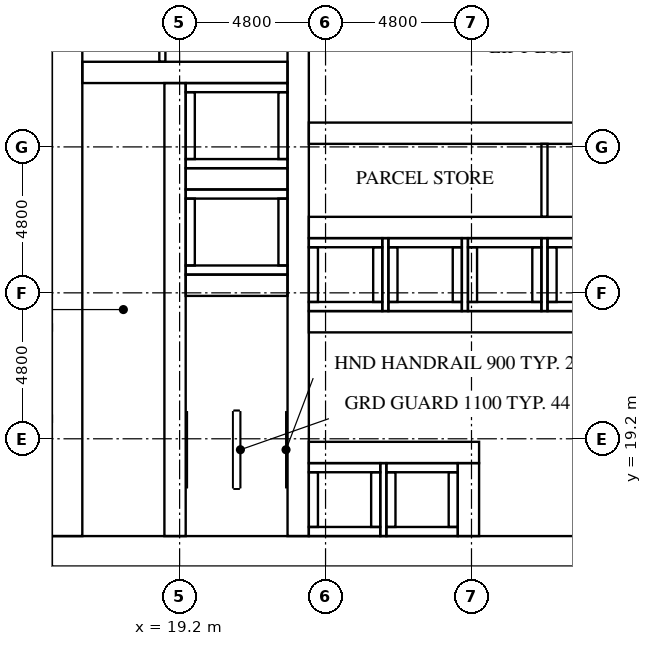
"""IFC4 building model, lengths in metres.
Left out: names, types, materials, properties, quantities, classifications, styles, units other than length and angle.
Written with IfcOpenShell. Run it as: python <this file> out.ifc"""

import sys

from ifc_helpers import new_model, si_unit, direction, frame, frame_2d, origin, place, context, subcontext, project, spatial, rectangle, extrude, element, fill, save


model = new_model("IFC4")
c1 = context("Model", 3, precision=1e-05, world=origin(), true_north=direction((0.0, 1.0)))
c2 = subcontext(c1, "Body", "Model", "MODEL_VIEW")
j1 = project(units=[si_unit("LENGTHUNIT", "METRE"), si_unit("PLANEANGLEUNIT", "RADIAN")], contexts=[c1])
p1 = place(None, origin())
s1 = spatial("IfcSite", under=j1, at=p1, CompositionType="ELEMENT")
p2 = place(p1, origin())
s2 = spatial("IfcBuilding", under=s1, at=p2, CompositionType="ELEMENT")
p3 = place(p2, origin())
s3 = spatial("IfcBuildingStorey", under=s2, at=p3, CompositionType="ELEMENT", Elevation=0.0)
p4 = place(p3, frame((15.0, 15.5, 0.0), z_axis=(0.0, 0.0, 1.0), x_axis=(1.0, 0.0, 0.0)))
e1 = element("IfcWall", 1, at=p4, inside=s3, PredefinedType="SHEAR", context=c2, shape_type="SweptSolid", body=[
    extrude(rectangle(XDim=32.4, YDim=1.0, at=frame_2d((16.2, 0.0))), origin(), (0.0, 0.0, 1.0), 5.7),
])
p5 = place(p4, frame((15.3, 0.0, 0.0)))
e2 = element("IfcOpeningElement", 2, at=p5, cuts=e1, PredefinedType="OPENING", context=c2, shape_type="SweptSolid", body=[
    extrude(rectangle(XDim=1.8, YDim=2.1, at=frame_2d((0.9, 1.05))), frame((0.0, 0.51, 0.0), z_axis=(0.0, -1.0, 0.0), x_axis=(1.0, 0.0, 0.0)), (0.0, 0.0, 1.0), 1.02),
])
p6 = place(p3, frame((15.5, 16.0, 0.0), z_axis=(0.0, 0.0, 1.0), x_axis=(0.0, 1.0, 0.0)))
e3 = element("IfcWall", 3, at=p6, inside=s3, PredefinedType="SHEAR", context=c2, shape_type="SweptSolid", body=[
    extrude(rectangle(XDim=20.8, YDim=1.0, at=frame_2d((10.4, 0.0))), origin(), (0.0, 0.0, 1.0), 5.7),
])
p7 = place(p6, frame((4.76, 0.0, 0.0)))
e4 = element("IfcOpeningElement", 4, at=p7, cuts=e3, PredefinedType="OPENING", context=c2, shape_type="SweptSolid", body=[
    extrude(rectangle(XDim=1.2, YDim=2.1, at=frame_2d((0.6, 1.05))), frame((0.0, 0.51, 0.0), z_axis=(0.0, -1.0, 0.0), x_axis=(1.0, 0.0, 0.0)), (0.0, 0.0, 1.0), 1.02),
])
p8 = place(p3, frame((19.05, 16.0, 0.0), z_axis=(0.0, 0.0, 1.0), x_axis=(0.0, 1.0, 0.0)))
e5 = element("IfcWall", 5, at=p8, inside=s3, PredefinedType="SHEAR", context=c2, shape_type="SweptSolid", body=[
    extrude(rectangle(XDim=14.9, YDim=0.7, at=frame_2d((7.45, 0.0))), origin(), (0.0, 0.0, 1.0), 5.7),
])
p9 = place(p8, frame((9.45, 0.0, 0.0)))
e6 = element("IfcOpeningElement", 6, at=p9, cuts=e5, PredefinedType="OPENING", context=c2, shape_type="SweptSolid", body=[
    extrude(rectangle(XDim=1.1, YDim=2.1, at=frame_2d((0.55, 1.05))), frame((0.0, 0.36, 0.0), z_axis=(0.0, -1.0, 0.0), x_axis=(1.0, 0.0, 0.0)), (0.0, 0.0, 1.0), 0.72),
])
p10 = place(p8, frame((12.95, 0.0, 0.0)))
e7 = element("IfcOpeningElement", 7, at=p10, cuts=e5, PredefinedType="OPENING", context=c2, shape_type="SweptSolid", body=[
    extrude(rectangle(XDim=1.1, YDim=2.1, at=frame_2d((0.55, 1.05))), frame((0.0, 0.36, 0.0), z_axis=(0.0, -1.0, 0.0), x_axis=(1.0, 0.0, 0.0)), (0.0, 0.0, 1.0), 0.72),
])
p11 = place(p8, frame((0.2, 0.0, 0.0)))
e8 = element("IfcOpeningElement", 8, at=p11, cuts=e5, PredefinedType="OPENING", context=c2, shape_type="SweptSolid", body=[
    extrude(rectangle(XDim=1.2, YDim=2.1, at=frame_2d((0.6, 1.05))), frame((0.0, 0.36, 0.0), z_axis=(0.0, -1.0, 0.0), x_axis=(1.0, 0.0, 0.0)), (0.0, 0.0, 1.0), 0.72),
])
p12 = place(p3, frame((23.1, 16.0, 0.0), z_axis=(0.0, 0.0, 1.0), x_axis=(0.0, 1.0, 0.0)))
e9 = element("IfcWall", 9, at=p12, inside=s3, PredefinedType="SHEAR", context=c2, shape_type="SweptSolid", body=[
    extrude(rectangle(XDim=20.8, YDim=0.7, at=frame_2d((10.4, 0.0))), origin(), (0.0, 0.0, 1.0), 5.7),
])
for number, where, z_axis, x_axis in (
    (10, (19.4, 24.25, 0.0), (0.0, 0.0, 1.0), (1.0, 0.0, 0.0)),
    (11, (19.4, 27.75, 0.0), (0.0, 0.0, 1.0), (1.0, 0.0, 0.0)),
):
    element("IfcWall", number, at=place(p3, frame(where, z_axis=z_axis, x_axis=x_axis)), inside=s3, PredefinedType="SHEAR", context=c2, shape_type="SweptSolid", body=[
        extrude(rectangle(XDim=3.35, YDim=0.7, at=frame_2d((1.675, 0.0))), origin(), (0.0, 0.0, 1.0), 5.7),
    ])
p13 = place(p3, frame((16.0, 31.25, 0.0), z_axis=(0.0, 0.0, 1.0), x_axis=(1.0, 0.0, 0.0)))
e12 = element("IfcWall", 12, at=p13, inside=s3, PredefinedType="SHEAR", context=c2, shape_type="SweptSolid", body=[
    extrude(rectangle(XDim=6.75, YDim=0.7, at=frame_2d((3.375, 0.0))), origin(), (0.0, 0.0, 1.0), 5.7),
])
p14 = place(p3, frame((23.45, 18.75, 0.0), z_axis=(0.0, 0.0, 1.0), x_axis=(1.0, 0.0, 0.0)))
e13 = element("IfcWall", 13, at=p14, inside=s3, PredefinedType="SHEAR", context=c2, shape_type="SweptSolid", body=[
    extrude(rectangle(XDim=5.6, YDim=0.7, at=frame_2d((2.8, 0.0))), origin(), (0.0, 0.0, 1.0), 5.7),
])
p15 = place(p14, frame((0.625, 0.0, 0.0)))
e14 = element("IfcOpeningElement", 14, at=p15, cuts=e13, PredefinedType="OPENING", context=c2, shape_type="SweptSolid", body=[
    extrude(rectangle(XDim=1.1, YDim=2.1, at=frame_2d((0.55, 1.05))), frame((0.0, 0.36, 0.0), z_axis=(0.0, -1.0, 0.0), x_axis=(1.0, 0.0, 0.0)), (0.0, 0.0, 1.0), 0.72),
])
p16 = place(p14, frame((3.175, 0.0, 0.0)))
e15 = element("IfcOpeningElement", 15, at=p16, cuts=e13, PredefinedType="OPENING", context=c2, shape_type="SweptSolid", body=[
    extrude(rectangle(XDim=1.1, YDim=2.1, at=frame_2d((0.55, 1.05))), frame((0.0, 0.36, 0.0), z_axis=(0.0, -1.0, 0.0), x_axis=(1.0, 0.0, 0.0)), (0.0, 0.0, 1.0), 0.72),
])
p17 = place(p3, frame((23.45, 23.05, 0.0), z_axis=(0.0, 0.0, 1.0), x_axis=(1.0, 0.0, 0.0)))
e16 = element("IfcWall", 16, at=p17, inside=s3, PredefinedType="SHEAR", context=c2, shape_type="SweptSolid", body=[
    extrude(rectangle(XDim=15.5, YDim=0.7, at=frame_2d((7.75, 0.0))), origin(), (0.0, 0.0, 1.0), 5.7),
])
p18 = place(p17, frame((0.658, 0.0, 0.0)))
e17 = element("IfcOpeningElement", 17, at=p18, cuts=e16, PredefinedType="OPENING", context=c2, shape_type="SweptSolid", body=[
    extrude(rectangle(XDim=1.1, YDim=2.1, at=frame_2d((0.55, 1.05))), frame((0.0, 0.36, 0.0), z_axis=(0.0, -1.0, 0.0), x_axis=(1.0, 0.0, 0.0)), (0.0, 0.0, 1.0), 0.72),
])
p19 = place(p17, frame((3.275, 0.0, 0.0)))
e18 = element("IfcOpeningElement", 18, at=p19, cuts=e16, PredefinedType="OPENING", context=c2, shape_type="SweptSolid", body=[
    extrude(rectangle(XDim=1.1, YDim=2.1, at=frame_2d((0.55, 1.05))), frame((0.0, 0.36, 0.0), z_axis=(0.0, -1.0, 0.0), x_axis=(1.0, 0.0, 0.0)), (0.0, 0.0, 1.0), 0.72),
])
p20 = place(p17, frame((5.892, 0.0, 0.0)))
e19 = element("IfcOpeningElement", 19, at=p20, cuts=e16, PredefinedType="OPENING", context=c2, shape_type="SweptSolid", body=[
    extrude(rectangle(XDim=1.1, YDim=2.1, at=frame_2d((0.55, 1.05))), frame((0.0, 0.36, 0.0), z_axis=(0.0, -1.0, 0.0), x_axis=(1.0, 0.0, 0.0)), (0.0, 0.0, 1.0), 0.72),
])
p21 = place(p17, frame((8.508, 0.0, 0.0)))
e20 = element("IfcOpeningElement", 20, at=p21, cuts=e16, PredefinedType="OPENING", context=c2, shape_type="SweptSolid", body=[
    extrude(rectangle(XDim=1.1, YDim=2.1, at=frame_2d((0.55, 1.05))), frame((0.0, 0.36, 0.0), z_axis=(0.0, -1.0, 0.0), x_axis=(1.0, 0.0, 0.0)), (0.0, 0.0, 1.0), 0.72),
])
p22 = place(p17, frame((12.483, 0.0, 0.0)))
e21 = element("IfcOpeningElement", 21, at=p22, cuts=e16, PredefinedType="OPENING", context=c2, shape_type="SweptSolid", body=[
    extrude(rectangle(XDim=1.0, YDim=2.1, at=frame_2d((0.5, 1.05))), frame((0.0, 0.36, 0.0), z_axis=(0.0, -1.0, 0.0), x_axis=(1.0, 0.0, 0.0)), (0.0, 0.0, 1.0), 0.72),
])
p23 = place(p3, frame((23.45, 26.15, 0.0), z_axis=(0.0, 0.0, 1.0), x_axis=(1.0, 0.0, 0.0)))
e22 = element("IfcWall", 22, at=p23, inside=s3, PredefinedType="SHEAR", context=c2, shape_type="SweptSolid", body=[
    extrude(rectangle(XDim=15.5, YDim=0.7, at=frame_2d((7.75, 0.0))), origin(), (0.0, 0.0, 1.0), 5.7),
])
p24 = place(p3, frame((23.45, 29.25, 0.0), z_axis=(0.0, 0.0, 1.0), x_axis=(1.0, 0.0, 0.0)))
e23 = element("IfcWall", 23, at=p24, inside=s3, PredefinedType="SHEAR", context=c2, shape_type="SweptSolid", body=[
    extrude(rectangle(XDim=15.5, YDim=0.7, at=frame_2d((7.75, 0.0))), origin(), (0.0, 0.0, 1.0), 5.7),
])
p25 = place(p24, frame((3.325, 0.0, 0.0)))
e24 = element("IfcOpeningElement", 24, at=p25, cuts=e23, PredefinedType="OPENING", context=c2, shape_type="SweptSolid", body=[
    extrude(rectangle(XDim=1.0, YDim=2.1, at=frame_2d((0.5, 1.05))), frame((0.0, 0.36, 0.0), z_axis=(0.0, -1.0, 0.0), x_axis=(1.0, 0.0, 0.0)), (0.0, 0.0, 1.0), 0.72),
])
p26 = place(p24, frame((11.175, 0.0, 0.0)))
e25 = element("IfcOpeningElement", 25, at=p26, cuts=e23, PredefinedType="OPENING", context=c2, shape_type="SweptSolid", body=[
    extrude(rectangle(XDim=1.0, YDim=2.1, at=frame_2d((0.5, 1.05))), frame((0.0, 0.36, 0.0), z_axis=(0.0, -1.0, 0.0), x_axis=(1.0, 0.0, 0.0)), (0.0, 0.0, 1.0), 0.72),
])
p27 = place(p3, frame((28.7, 16.0, 0.0), z_axis=(0.0, 0.0, 1.0), x_axis=(0.0, 1.0, 0.0)))
e26 = element("IfcWall", 26, at=p27, inside=s3, PredefinedType="SHEAR", context=c2, shape_type="SweptSolid", body=[
    extrude(rectangle(XDim=2.4, YDim=0.7, at=frame_2d((1.2, 0.0))), origin(), (0.0, 0.0, 1.0), 5.7),
])
for number, where, z_axis, x_axis in (
    (27, (23.45, 16.15, -1.8), (0.0, 0.0, 1.0), (1.0, 0.0, 0.0)),
    (28, (23.45, 18.25, -1.8), (0.0, 0.0, 1.0), (1.0, 0.0, 0.0)),
):
    element("IfcWall", number, at=place(p3, frame(where, z_axis=z_axis, x_axis=x_axis)), inside=s3, PredefinedType="SOLIDWALL", context=c2, shape_type="SweptSolid", body=[
        extrude(rectangle(XDim=2.35, YDim=0.3, at=frame_2d((1.175, 0.0))), origin(), (0.0, 0.0, 1.0), 1.8),
    ])
for number, where, z_axis, x_axis in (
    (29, (23.6, 16.3, -1.8), (0.0, 0.0, 1.0), (0.0, 1.0, 0.0)),
    (30, (25.65, 16.3, -1.8), (0.0, 0.0, 1.0), (0.0, 1.0, 0.0)),
):
    element("IfcWall", number, at=place(p3, frame(where, z_axis=z_axis, x_axis=x_axis)), inside=s3, PredefinedType="SOLIDWALL", context=c2, shape_type="SweptSolid", body=[
        extrude(rectangle(XDim=1.8, YDim=0.3, at=frame_2d((0.9, 0.0))), origin(), (0.0, 0.0, 1.0), 1.8),
    ])
for number, where, z_axis, x_axis in (
    (31, (26.0, 16.15, -1.8), (0.0, 0.0, 1.0), (1.0, 0.0, 0.0)),
    (32, (26.0, 18.25, -1.8), (0.0, 0.0, 1.0), (1.0, 0.0, 0.0)),
):
    element("IfcWall", number, at=place(p3, frame(where, z_axis=z_axis, x_axis=x_axis)), inside=s3, PredefinedType="SOLIDWALL", context=c2, shape_type="SweptSolid", body=[
        extrude(rectangle(XDim=2.35, YDim=0.3, at=frame_2d((1.175, 0.0))), origin(), (0.0, 0.0, 1.0), 1.8),
    ])
for number, where, z_axis, x_axis in (
    (33, (26.15, 16.3, -1.8), (0.0, 0.0, 1.0), (0.0, 1.0, 0.0)),
    (34, (28.2, 16.3, -1.8), (0.0, 0.0, 1.0), (0.0, 1.0, 0.0)),
):
    element("IfcWall", number, at=place(p3, frame(where, z_axis=z_axis, x_axis=x_axis)), inside=s3, PredefinedType="SOLIDWALL", context=c2, shape_type="SweptSolid", body=[
        extrude(rectangle(XDim=1.8, YDim=0.3, at=frame_2d((0.9, 0.0))), origin(), (0.0, 0.0, 1.0), 1.8),
    ])
for number, where, z_axis, x_axis in (
    (35, (23.45, 23.55, -1.8), (0.0, 0.0, 1.0), (1.0, 0.0, 0.0)),
    (36, (23.45, 25.65, -1.8), (0.0, 0.0, 1.0), (1.0, 0.0, 0.0)),
):
    element("IfcWall", number, at=place(p3, frame(where, z_axis=z_axis, x_axis=x_axis)), inside=s3, PredefinedType="SOLIDWALL", context=c2, shape_type="SweptSolid", body=[
        extrude(rectangle(XDim=2.417, YDim=0.3, at=frame_2d((1.208, 0.0))), origin(), (0.0, 0.0, 1.0), 1.8),
    ])
for number, where, z_axis, x_axis in (
    (37, (23.6, 23.7, -1.8), (0.0, 0.0, 1.0), (0.0, 1.0, 0.0)),
    (38, (25.717, 23.7, -1.8), (0.0, 0.0, 1.0), (0.0, 1.0, 0.0)),
):
    element("IfcWall", number, at=place(p3, frame(where, z_axis=z_axis, x_axis=x_axis)), inside=s3, PredefinedType="SOLIDWALL", context=c2, shape_type="SweptSolid", body=[
        extrude(rectangle(XDim=1.8, YDim=0.3, at=frame_2d((0.9, 0.0))), origin(), (0.0, 0.0, 1.0), 1.8),
    ])
for number, where, z_axis, x_axis in (
    (39, (26.067, 23.55, -1.8), (0.0, 0.0, 1.0), (1.0, 0.0, 0.0)),
    (40, (26.067, 25.65, -1.8), (0.0, 0.0, 1.0), (1.0, 0.0, 0.0)),
):
    element("IfcWall", number, at=place(p3, frame(where, z_axis=z_axis, x_axis=x_axis)), inside=s3, PredefinedType="SOLIDWALL", context=c2, shape_type="SweptSolid", body=[
        extrude(rectangle(XDim=2.417, YDim=0.3, at=frame_2d((1.208, 0.0))), origin(), (0.0, 0.0, 1.0), 1.8),
    ])
for number, where, z_axis, x_axis in (
    (41, (26.217, 23.7, -1.8), (0.0, 0.0, 1.0), (0.0, 1.0, 0.0)),
    (42, (28.333, 23.7, -1.8), (0.0, 0.0, 1.0), (0.0, 1.0, 0.0)),
):
    element("IfcWall", number, at=place(p3, frame(where, z_axis=z_axis, x_axis=x_axis)), inside=s3, PredefinedType="SOLIDWALL", context=c2, shape_type="SweptSolid", body=[
        extrude(rectangle(XDim=1.8, YDim=0.3, at=frame_2d((0.9, 0.0))), origin(), (0.0, 0.0, 1.0), 1.8),
    ])
for number, where, z_axis, x_axis in (
    (43, (28.683, 23.55, -1.8), (0.0, 0.0, 1.0), (1.0, 0.0, 0.0)),
    (44, (28.683, 25.65, -1.8), (0.0, 0.0, 1.0), (1.0, 0.0, 0.0)),
):
    element("IfcWall", number, at=place(p3, frame(where, z_axis=z_axis, x_axis=x_axis)), inside=s3, PredefinedType="SOLIDWALL", context=c2, shape_type="SweptSolid", body=[
        extrude(rectangle(XDim=2.417, YDim=0.3, at=frame_2d((1.208, 0.0))), origin(), (0.0, 0.0, 1.0), 1.8),
    ])
for number, where, z_axis, x_axis in (
    (45, (28.833, 23.7, -1.8), (0.0, 0.0, 1.0), (0.0, 1.0, 0.0)),
    (46, (30.95, 23.7, -1.8), (0.0, 0.0, 1.0), (0.0, 1.0, 0.0)),
):
    element("IfcWall", number, at=place(p3, frame(where, z_axis=z_axis, x_axis=x_axis)), inside=s3, PredefinedType="SOLIDWALL", context=c2, shape_type="SweptSolid", body=[
        extrude(rectangle(XDim=1.8, YDim=0.3, at=frame_2d((0.9, 0.0))), origin(), (0.0, 0.0, 1.0), 1.8),
    ])
for number, where, z_axis, x_axis in (
    (47, (31.3, 23.55, -1.8), (0.0, 0.0, 1.0), (1.0, 0.0, 0.0)),
    (48, (31.3, 25.65, -1.8), (0.0, 0.0, 1.0), (1.0, 0.0, 0.0)),
):
    element("IfcWall", number, at=place(p3, frame(where, z_axis=z_axis, x_axis=x_axis)), inside=s3, PredefinedType="SOLIDWALL", context=c2, shape_type="SweptSolid", body=[
        extrude(rectangle(XDim=2.417, YDim=0.3, at=frame_2d((1.208, 0.0))), origin(), (0.0, 0.0, 1.0), 1.8),
    ])
p28 = place(p3, frame((31.45, 23.7, -1.8), z_axis=(0.0, 0.0, 1.0), x_axis=(0.0, 1.0, 0.0)))
e49 = element("IfcWall", 49, at=p28, inside=s3, PredefinedType="SOLIDWALL", context=c2, shape_type="SweptSolid", body=[
    extrude(rectangle(XDim=1.8, YDim=0.3, at=frame_2d((0.9, 0.0))), origin(), (0.0, 0.0, 1.0), 1.8),
])
for number, where, z_axis, x_axis in (
    (50, (19.4, 24.75, -1.8), (0.0, 0.0, 1.0), (1.0, 0.0, 0.0)),
    (51, (19.4, 27.25, -1.8), (0.0, 0.0, 1.0), (1.0, 0.0, 0.0)),
):
    element("IfcWall", number, at=place(p3, frame(where, z_axis=z_axis, x_axis=x_axis)), inside=s3, PredefinedType="SOLIDWALL", context=c2, shape_type="SweptSolid", body=[
        extrude(rectangle(XDim=3.35, YDim=0.3, at=frame_2d((1.675, 0.0))), origin(), (0.0, 0.0, 1.0), 1.8),
    ])
for number, where, z_axis, x_axis in (
    (52, (19.55, 24.9, -1.8), (0.0, 0.0, 1.0), (0.0, 1.0, 0.0)),
    (53, (22.6, 24.9, -1.8), (0.0, 0.0, 1.0), (0.0, 1.0, 0.0)),
):
    element("IfcWall", number, at=place(p3, frame(where, z_axis=z_axis, x_axis=x_axis)), inside=s3, PredefinedType="SOLIDWALL", context=c2, shape_type="SweptSolid", body=[
        extrude(rectangle(XDim=2.2, YDim=0.3, at=frame_2d((1.1, 0.0))), origin(), (0.0, 0.0, 1.0), 1.8),
    ])
for number, where, z_axis, x_axis in (
    (54, (19.4, 28.25, -1.8), (0.0, 0.0, 1.0), (1.0, 0.0, 0.0)),
    (55, (19.4, 30.75, -1.8), (0.0, 0.0, 1.0), (1.0, 0.0, 0.0)),
):
    element("IfcWall", number, at=place(p3, frame(where, z_axis=z_axis, x_axis=x_axis)), inside=s3, PredefinedType="SOLIDWALL", context=c2, shape_type="SweptSolid", body=[
        extrude(rectangle(XDim=3.35, YDim=0.3, at=frame_2d((1.675, 0.0))), origin(), (0.0, 0.0, 1.0), 1.8),
    ])
for number, where, z_axis, x_axis in (
    (56, (19.55, 28.4, -1.8), (0.0, 0.0, 1.0), (0.0, 1.0, 0.0)),
    (57, (22.6, 28.4, -1.8), (0.0, 0.0, 1.0), (0.0, 1.0, 0.0)),
):
    element("IfcWall", number, at=place(p3, frame(where, z_axis=z_axis, x_axis=x_axis)), inside=s3, PredefinedType="SOLIDWALL", context=c2, shape_type="SweptSolid", body=[
        extrude(rectangle(XDim=2.2, YDim=0.3, at=frame_2d((1.1, 0.0))), origin(), (0.0, 0.0, 1.0), 1.8),
    ])
for number, where, z_axis, x_axis in (
    (58, (25.967, 23.4, 0.0), (0.0, 0.0, 1.0), (0.0, 1.0, 0.0)),
    (59, (28.583, 23.4, 0.0), (0.0, 0.0, 1.0), (0.0, 1.0, 0.0)),
    (60, (31.2, 23.4, 0.0), (0.0, 0.0, 1.0), (0.0, 1.0, 0.0)),
):
    element("IfcWall", number, at=place(p3, frame(where, z_axis=z_axis, x_axis=x_axis)), inside=s3, PredefinedType="SOLIDWALL", context=c2, shape_type="SweptSolid", body=[
        extrude(rectangle(XDim=2.4, YDim=0.2, at=frame_2d((1.2, 0.0))), origin(), (0.0, 0.0, 1.0), 5.7),
    ])
p29 = place(p3, frame((25.9, 16.0, 0.0), z_axis=(0.0, 0.0, 1.0), x_axis=(0.0, 1.0, 0.0)))
e61 = element("IfcWall", 61, at=p29, inside=s3, PredefinedType="SOLIDWALL", context=c2, shape_type="SweptSolid", body=[
    extrude(rectangle(XDim=2.4, YDim=0.2, at=frame_2d((1.2, 0.0))), origin(), (0.0, 0.0, 1.0), 5.7),
])
p30 = place(p3, frame((18.633, 31.6, 0.0), z_axis=(0.0, 0.0, 1.0), x_axis=(0.0, 1.0, 0.0)))
e62 = element("IfcWall", 62, at=p30, inside=s3, PredefinedType="PARTITIONING", context=c2, shape_type="SweptSolid", body=[
    extrude(rectangle(XDim=5.2, YDim=0.2, at=frame_2d((2.6, 0.0))), origin(), (0.0, 0.0, 1.0), 5.7),
])
p31 = place(p3, frame((31.2, 26.5, 0.0), z_axis=(0.0, 0.0, 1.0), x_axis=(0.0, 1.0, 0.0)))
e63 = element("IfcWall", 63, at=p31, inside=s3, PredefinedType="PARTITIONING", context=c2, shape_type="SweptSolid", body=[
    extrude(rectangle(XDim=2.4, YDim=0.2, at=frame_2d((1.2, 0.0))), origin(), (0.0, 0.0, 1.0), 5.7),
])
p32 = place(p15, origin())
e64 = element("IfcDoor", 64, at=p32, inside=s3, OperationType="DOUBLE_DOOR_SLIDING", PredefinedType="DOOR", context=c2, shape_type="SweptSolid", body=[
    extrude(rectangle(XDim=1.1, YDim=2.1, at=frame_2d((0.55, 1.05))), frame((0.0, 0.025, 0.0), z_axis=(0.0, -1.0, 0.0), x_axis=(1.0, 0.0, 0.0)), (0.0, 0.0, 1.0), 0.05),
])
fill(e14, e64)
p33 = place(p16, origin())
e65 = element("IfcDoor", 65, at=p33, inside=s3, OperationType="DOUBLE_DOOR_SLIDING", PredefinedType="DOOR", context=c2, shape_type="SweptSolid", body=[
    extrude(rectangle(XDim=1.1, YDim=2.1, at=frame_2d((0.55, 1.05))), frame((0.0, 0.025, 0.0), z_axis=(0.0, -1.0, 0.0), x_axis=(1.0, 0.0, 0.0)), (0.0, 0.0, 1.0), 0.05),
])
fill(e15, e65)
p34 = place(p18, origin())
e66 = element("IfcDoor", 66, at=p34, inside=s3, OperationType="DOUBLE_DOOR_SLIDING", PredefinedType="DOOR", context=c2, shape_type="SweptSolid", body=[
    extrude(rectangle(XDim=1.1, YDim=2.1, at=frame_2d((0.55, 1.05))), frame((0.0, 0.025, 0.0), z_axis=(0.0, -1.0, 0.0), x_axis=(1.0, 0.0, 0.0)), (0.0, 0.0, 1.0), 0.05),
])
fill(e17, e66)
p35 = place(p19, origin())
e67 = element("IfcDoor", 67, at=p35, inside=s3, OperationType="DOUBLE_DOOR_SLIDING", PredefinedType="DOOR", context=c2, shape_type="SweptSolid", body=[
    extrude(rectangle(XDim=1.1, YDim=2.1, at=frame_2d((0.55, 1.05))), frame((0.0, 0.025, 0.0), z_axis=(0.0, -1.0, 0.0), x_axis=(1.0, 0.0, 0.0)), (0.0, 0.0, 1.0), 0.05),
])
fill(e18, e67)
p36 = place(p20, origin())
e68 = element("IfcDoor", 68, at=p36, inside=s3, OperationType="DOUBLE_DOOR_SLIDING", PredefinedType="DOOR", context=c2, shape_type="SweptSolid", body=[
    extrude(rectangle(XDim=1.1, YDim=2.1, at=frame_2d((0.55, 1.05))), frame((0.0, 0.025, 0.0), z_axis=(0.0, -1.0, 0.0), x_axis=(1.0, 0.0, 0.0)), (0.0, 0.0, 1.0), 0.05),
])
fill(e19, e68)
p37 = place(p21, origin())
e69 = element("IfcDoor", 69, at=p37, inside=s3, OperationType="DOUBLE_DOOR_SLIDING", PredefinedType="DOOR", context=c2, shape_type="SweptSolid", body=[
    extrude(rectangle(XDim=1.1, YDim=2.1, at=frame_2d((0.55, 1.05))), frame((0.0, 0.025, 0.0), z_axis=(0.0, -1.0, 0.0), x_axis=(1.0, 0.0, 0.0)), (0.0, 0.0, 1.0), 0.05),
])
fill(e20, e69)
p38 = place(p9, origin())
e70 = element("IfcDoor", 70, at=p38, inside=s3, OperationType="DOUBLE_DOOR_SLIDING", PredefinedType="DOOR", context=c2, shape_type="SweptSolid", body=[
    extrude(rectangle(XDim=1.1, YDim=2.1, at=frame_2d((0.55, 1.05))), frame((0.0, 0.025, 0.0), z_axis=(0.0, -1.0, 0.0), x_axis=(1.0, 0.0, 0.0)), (0.0, 0.0, 1.0), 0.05),
])
fill(e6, e70)
p39 = place(p10, origin())
e71 = element("IfcDoor", 71, at=p39, inside=s3, OperationType="DOUBLE_DOOR_SLIDING", PredefinedType="DOOR", context=c2, shape_type="SweptSolid", body=[
    extrude(rectangle(XDim=1.1, YDim=2.1, at=frame_2d((0.55, 1.05))), frame((0.0, 0.025, 0.0), z_axis=(0.0, -1.0, 0.0), x_axis=(1.0, 0.0, 0.0)), (0.0, 0.0, 1.0), 0.05),
])
fill(e7, e71)
p40 = place(p11, origin())
e72 = element("IfcDoor", 72, at=p40, inside=s3, OperationType="SINGLE_SWING_RIGHT", PredefinedType="DOOR", context=c2, shape_type="SweptSolid", body=[
    extrude(rectangle(XDim=1.2, YDim=2.1, at=frame_2d((0.6, 1.05))), frame((0.0, 0.025, 0.0), z_axis=(0.0, -1.0, 0.0), x_axis=(1.0, 0.0, 0.0)), (0.0, 0.0, 1.0), 0.05),
])
fill(e8, e72)
p41 = place(p5, frame((1.8, 0.0, 0.0), z_axis=(0.0, 0.0, 1.0), x_axis=(-1.0, 0.0, 0.0)))
e73 = element("IfcDoor", 73, at=p41, inside=s3, OperationType="DOUBLE_DOOR_SINGLE_SWING", PredefinedType="DOOR", context=c2, shape_type="SweptSolid", body=[
    extrude(rectangle(XDim=1.8, YDim=2.1, at=frame_2d((0.9, 1.05))), frame((0.0, 0.025, 0.0), z_axis=(0.0, -1.0, 0.0), x_axis=(1.0, 0.0, 0.0)), (0.0, 0.0, 1.0), 0.05),
])
fill(e2, e73)
p42 = place(p7, origin())
e74 = element("IfcDoor", 74, at=p42, inside=s3, OperationType="SINGLE_SWING_LEFT", PredefinedType="DOOR", context=c2, shape_type="SweptSolid", body=[
    extrude(rectangle(XDim=1.2, YDim=2.1, at=frame_2d((0.6, 1.05))), frame((0.0, 0.025, 0.0), z_axis=(0.0, -1.0, 0.0), x_axis=(1.0, 0.0, 0.0)), (0.0, 0.0, 1.0), 0.05),
])
fill(e4, e74)
p43 = place(p25, origin())
e75 = element("IfcDoor", 75, at=p43, inside=s3, OperationType="SINGLE_SWING_RIGHT", PredefinedType="DOOR", context=c2, shape_type="SweptSolid", body=[
    extrude(rectangle(XDim=1.0, YDim=2.1, at=frame_2d((0.5, 1.05))), frame((0.0, 0.025, 0.0), z_axis=(0.0, -1.0, 0.0), x_axis=(1.0, 0.0, 0.0)), (0.0, 0.0, 1.0), 0.05),
])
fill(e24, e75)
save(model, sys.argv[1])
